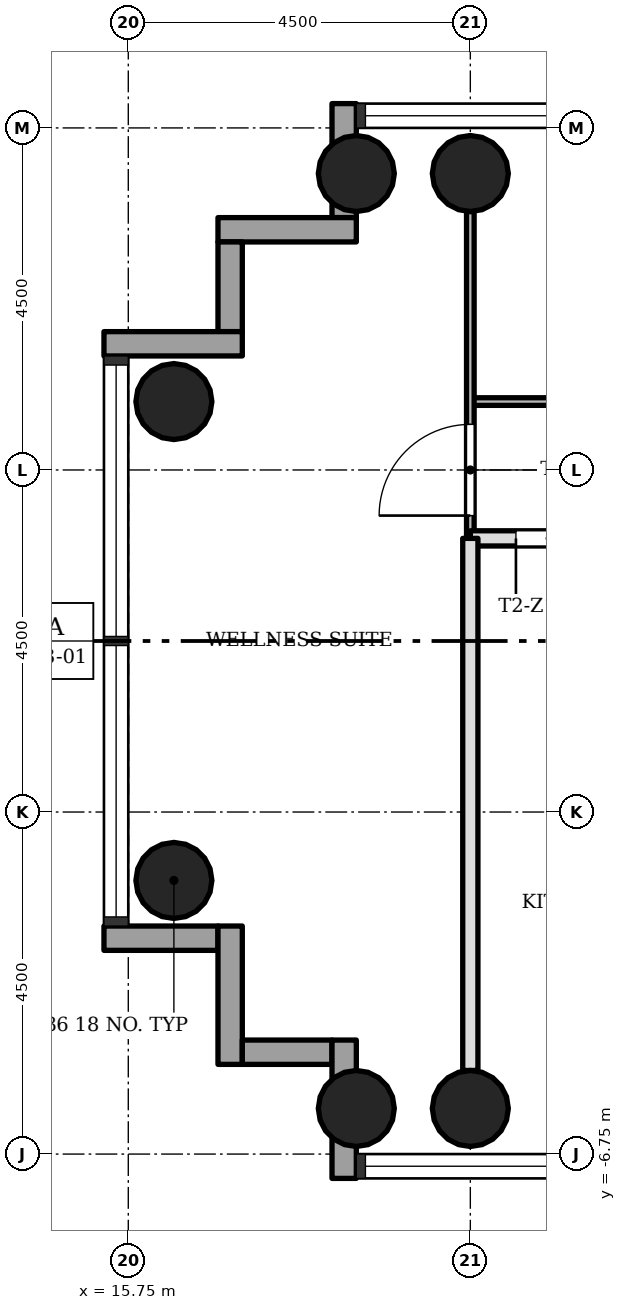
"""IFC4 building model, lengths in metres.
Left out: names, types, materials, properties, quantities, classifications, styles, units other than length and angle.
Written with IfcOpenShell. Run it as: python <this file> out.ifc"""

import sys

from ifc_helpers import new_model, si_unit, direction, frame, frame_2d, origin, origin_2d, place, context, subcontext, project, spatial, rectangle, hollow_circle, extrude, element, fill, save


model = new_model("IFC4")
c1 = context("Model", 3, precision=1e-05, world=origin(), true_north=direction((0.0, 1.0)))
c2 = subcontext(c1, "Body", "Model", "MODEL_VIEW")
j1 = project(units=[si_unit("LENGTHUNIT", "METRE"), si_unit("PLANEANGLEUNIT", "RADIAN")], contexts=[c1])
p1 = place(None, origin())
s1 = spatial("IfcSite", under=j1, at=p1, CompositionType="ELEMENT")
p2 = place(p1, origin())
s2 = spatial("IfcBuilding", under=s1, at=p2, CompositionType="ELEMENT")
p3 = place(p2, frame((0.0, 0.0, 48.3)))
s3 = spatial("IfcBuildingStorey", under=s2, at=p3, CompositionType="ELEMENT", Elevation=48.3)
for number, where, z_axis, x_axis in (
    (1, (20.25, 6.15, 0.0), (0.0, 0.0, 1.0), (1.0, 0.0, 0.0)),
    (2, (20.25, -6.15, 0.0), (0.0, 0.0, 1.0), (1.0, 0.0, 0.0)),
    (3, (18.75, 6.15, 0.0), (0.0, 0.0, 1.0), (1.0, 0.0, 0.0)),
    (4, (18.75, -6.15, 0.0), (0.0, 0.0, 1.0), (1.0, 0.0, 0.0)),
    (5, (16.35, 3.15, 0.0), (0.0, 0.0, 1.0), (1.0, 0.0, 0.0)),
    (6, (16.35, -3.15, 0.0), (0.0, 0.0, 1.0), (1.0, 0.0, 0.0)),
):
    element("IfcColumn", number, at=place(p3, frame(where, z_axis=z_axis, x_axis=x_axis)), inside=s3, PredefinedType="COLUMN", context=c2, shape_type="SweptSolid", body=[
        extrude(hollow_circle(Radius=0.5, WallThickness=0.036, at=origin_2d()), origin(), (0.0, 0.0, 1.0), 3.4),
    ])
p4 = place(p3, frame((18.59, 7.07, -0.3), z_axis=(0.0, 0.0, 1.0), x_axis=(0.0, -1.0, 0.0)))
e7 = element("IfcWall", 7, at=p4, inside=s3, PredefinedType="STANDARD", context=c2, shape_type="SweptSolid", body=[
    extrude(rectangle(XDim=1.5, YDim=0.32, at=frame_2d((0.75, 0.0))), origin(), (0.0, 0.0, 1.0), 3.4),
])
p5 = place(p3, frame((18.75, 5.41, -0.3), z_axis=(0.0, 0.0, 1.0), x_axis=(-1.0, 0.0, 0.0)))
e8 = element("IfcWall", 8, at=p5, inside=s3, PredefinedType="STANDARD", context=c2, shape_type="SweptSolid", body=[
    extrude(rectangle(XDim=1.82, YDim=0.32, at=frame_2d((0.91, 0.0))), origin(), (0.0, 0.0, 1.0), 3.4),
])
p6 = place(p3, frame((17.09, 5.25, -0.3), z_axis=(0.0, 0.0, 1.0), x_axis=(0.0, -1.0, 0.0)))
e9 = element("IfcWall", 9, at=p6, inside=s3, PredefinedType="STANDARD", context=c2, shape_type="SweptSolid", body=[
    extrude(rectangle(XDim=1.18, YDim=0.32, at=frame_2d((0.59, 0.0))), origin(), (0.0, 0.0, 1.0), 3.4),
])
p7 = place(p3, frame((17.25, 3.91, -0.3), z_axis=(0.0, 0.0, 1.0), x_axis=(-1.0, 0.0, 0.0)))
e10 = element("IfcWall", 10, at=p7, inside=s3, PredefinedType="STANDARD", context=c2, shape_type="SweptSolid", body=[
    extrude(rectangle(XDim=1.82, YDim=0.32, at=frame_2d((0.91, 0.0))), origin(), (0.0, 0.0, 1.0), 3.4),
])
p8 = place(p3, frame((15.43, -3.91, -0.3), z_axis=(0.0, 0.0, 1.0), x_axis=(1.0, 0.0, 0.0)))
e11 = element("IfcWall", 11, at=p8, inside=s3, PredefinedType="STANDARD", context=c2, shape_type="SweptSolid", body=[
    extrude(rectangle(XDim=1.5, YDim=0.32, at=frame_2d((0.75, 0.0))), origin(), (0.0, 0.0, 1.0), 3.4),
])
p9 = place(p3, frame((17.09, -3.75, -0.3), z_axis=(0.0, 0.0, 1.0), x_axis=(0.0, -1.0, 0.0)))
e12 = element("IfcWall", 12, at=p9, inside=s3, PredefinedType="STANDARD", context=c2, shape_type="SweptSolid", body=[
    extrude(rectangle(XDim=1.82, YDim=0.32, at=frame_2d((0.91, 0.0))), origin(), (0.0, 0.0, 1.0), 3.4),
])
p10 = place(p3, frame((17.25, -5.41, -0.3), z_axis=(0.0, 0.0, 1.0), x_axis=(1.0, 0.0, 0.0)))
e13 = element("IfcWall", 13, at=p10, inside=s3, PredefinedType="STANDARD", context=c2, shape_type="SweptSolid", body=[
    extrude(rectangle(XDim=1.18, YDim=0.32, at=frame_2d((0.59, 0.0))), origin(), (0.0, 0.0, 1.0), 3.4),
])
p11 = place(p3, frame((18.59, -5.25, -0.3), z_axis=(0.0, 0.0, 1.0), x_axis=(0.0, -1.0, 0.0)))
e14 = element("IfcWall", 14, at=p11, inside=s3, PredefinedType="STANDARD", context=c2, shape_type="SweptSolid", body=[
    extrude(rectangle(XDim=1.82, YDim=0.32, at=frame_2d((0.91, 0.0))), origin(), (0.0, 0.0, 1.0), 3.4),
])
p12 = place(p3, frame((24.75, 1.35, 0.0), z_axis=(0.0, 0.0, 1.0), x_axis=(-1.0, 0.0, 0.0)))
e15 = element("IfcWall", 15, at=p12, inside=s3, PredefinedType="SOLIDWALL", context=c2, shape_type="SweptSolid", body=[
    extrude(rectangle(XDim=4.5, YDim=0.2, at=frame_2d((2.25, 0.0))), origin(), (0.0, 0.0, 1.0), 3.0),
])
p13 = place(p12, frame((3.0, 0.0, 0.0)))
e16 = element("IfcOpeningElement", 16, at=p13, cuts=e15, PredefinedType="OPENING", context=c2, shape_type="SweptSolid", body=[
    extrude(rectangle(XDim=0.9, YDim=2.1, at=frame_2d((0.45, 1.05))), frame((0.0, 0.11, 0.0), z_axis=(0.0, -1.0, 0.0), x_axis=(1.0, 0.0, 0.0)), (0.0, 0.0, 1.0), 0.22),
])
p14 = place(p3, frame((29.25, 3.15, 0.0), z_axis=(0.0, 0.0, 1.0), x_axis=(-1.0, 0.0, 0.0)))
e17 = element("IfcWall", 17, at=p14, inside=s3, PredefinedType="PARTITIONING", context=c2, shape_type="SweptSolid", body=[
    extrude(rectangle(XDim=9.0, YDim=0.1, at=frame_2d((4.5, 0.0))), origin(), (0.0, 0.0, 1.0), 3.0),
])
p15 = place(p14, frame((1.8, 0.0, 0.0)))
e18 = element("IfcOpeningElement", 18, at=p15, cuts=e17, PredefinedType="OPENING", context=c2, shape_type="SweptSolid", body=[
    extrude(rectangle(XDim=0.9, YDim=2.1, at=frame_2d((0.45, 1.05))), frame((0.0, 0.06, 0.0), z_axis=(0.0, -1.0, 0.0), x_axis=(1.0, 0.0, 0.0)), (0.0, 0.0, 1.0), 0.12),
])
p16 = place(p14, frame((6.3, 0.0, 0.0)))
e19 = element("IfcOpeningElement", 19, at=p16, cuts=e17, PredefinedType="OPENING", context=c2, shape_type="SweptSolid", body=[
    extrude(rectangle(XDim=0.9, YDim=2.1, at=frame_2d((0.45, 1.05))), frame((0.0, 0.06, 0.0), z_axis=(0.0, -1.0, 0.0), x_axis=(1.0, 0.0, 0.0)), (0.0, 0.0, 1.0), 0.12),
])
p17 = place(p3, frame((20.25, 1.35, 0.0), z_axis=(0.0, 0.0, 1.0), x_axis=(0.0, 1.0, 0.0)))
e20 = element("IfcWall", 20, at=p17, inside=s3, PredefinedType="PARTITIONING", context=c2, shape_type="SweptSolid", body=[
    extrude(rectangle(XDim=4.3, YDim=0.1, at=frame_2d((2.15, 0.0))), origin(), (0.0, 0.0, 1.0), 3.0),
])
p18 = place(p17, frame((0.3, 0.0, 0.0)))
e21 = element("IfcOpeningElement", 21, at=p18, cuts=e20, PredefinedType="OPENING", context=c2, shape_type="SweptSolid", body=[
    extrude(rectangle(XDim=1.2, YDim=2.1, at=frame_2d((0.6, 1.05))), frame((0.0, 0.06, 0.0), z_axis=(0.0, -1.0, 0.0), x_axis=(1.0, 0.0, 0.0)), (0.0, 0.0, 1.0), 0.12),
])
p19 = place(p3, frame((20.25, -5.65, 0.0), z_axis=(0.0, 0.0, 1.0), x_axis=(0.0, 1.0, 0.0)))
e22 = element("IfcWall", 22, at=p19, inside=s3, PredefinedType="SOLIDWALL", context=c2, shape_type="SweptSolid", body=[
    extrude(rectangle(XDim=7.0, YDim=0.2, at=frame_2d((3.5, 0.0))), origin(), (0.0, 0.0, 1.0), 3.0),
])
p20 = place(p13, origin())
e23 = element("IfcDoor", 23, at=p20, inside=s3, OperationType="SINGLE_SWING_LEFT", PredefinedType="DOOR", context=c2, shape_type="SweptSolid", body=[
    extrude(rectangle(XDim=0.9, YDim=2.1, at=frame_2d((0.45, 1.05))), frame((0.0, 0.025, 0.0), z_axis=(0.0, -1.0, 0.0), x_axis=(1.0, 0.0, 0.0)), (0.0, 0.0, 1.0), 0.05),
])
fill(e16, e23)
p21 = place(p18, origin())
e24 = element("IfcDoor", 24, at=p21, inside=s3, OperationType="SINGLE_SWING_RIGHT", PredefinedType="DOOR", context=c2, shape_type="SweptSolid", body=[
    extrude(rectangle(XDim=1.2, YDim=2.1, at=frame_2d((0.6, 1.05))), frame((0.0, 0.025, 0.0), z_axis=(0.0, -1.0, 0.0), x_axis=(1.0, 0.0, 0.0)), (0.0, 0.0, 1.0), 0.05),
])
fill(e21, e24)
save(model, sys.argv[1])
